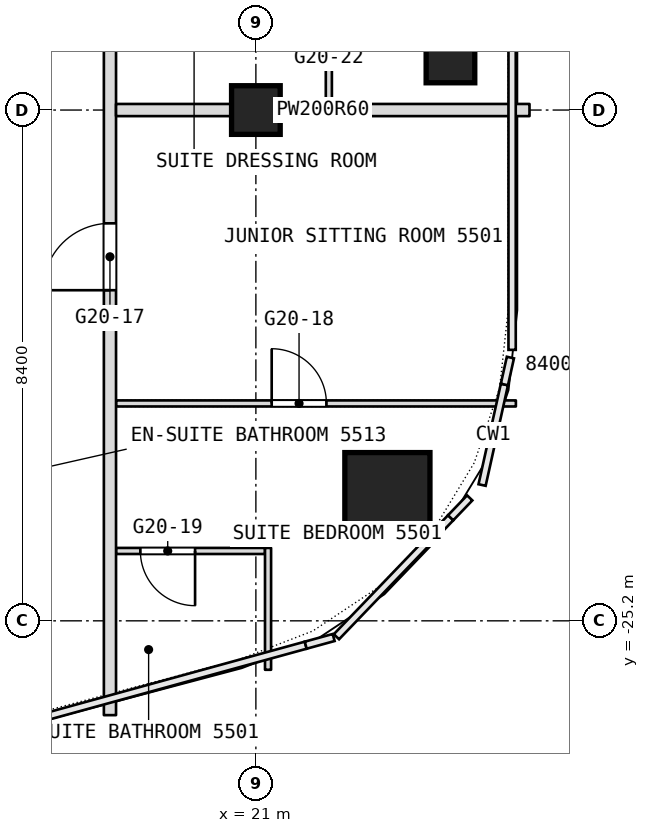
"""IFC4 building model, lengths in metres.
Left out: names, types, materials, properties, quantities, classifications, styles, units other than length and angle.
Written with IfcOpenShell. Run it as: python <this file> out.ifc"""

import sys

from ifc_helpers import new_model, si_unit, direction, frame, frame_2d, origin, origin_2d, place, context, subcontext, project, spatial, rectangle, extrude, element, fill, save


model = new_model("IFC4")
c1 = context("Model", 3, precision=1e-05, world=origin(), true_north=direction((0.0, 1.0)))
c2 = subcontext(c1, "Body", "Model", "MODEL_VIEW")
j1 = project(units=[si_unit("LENGTHUNIT", "METRE"), si_unit("PLANEANGLEUNIT", "RADIAN")], contexts=[c1])
p1 = place(None, origin())
s1 = spatial("IfcSite", under=j1, at=p1, CompositionType="ELEMENT")
p2 = place(p1, origin())
s2 = spatial("IfcBuilding", under=s1, at=p2, CompositionType="ELEMENT")
p3 = place(p2, frame((0.0, 0.0, 234.5)))
s3 = spatial("IfcBuildingStorey", under=s2, at=p3, CompositionType="ELEMENT", Elevation=234.5)
p4 = place(p3, frame((23.163, -23.133, 0.0), z_axis=(0.0, 0.0, 1.0), x_axis=(1.0, 0.0, 0.0)))
e1 = element("IfcColumn", 1, at=p4, inside=s3, PredefinedType="COLUMN", context=c2, shape_type="SweptSolid", body=[
    extrude(rectangle(XDim=1.4, YDim=1.4, at=origin_2d()), origin(), (0.0, 0.0, 1.0), 3.6),
])
for number, where, z_axis, x_axis in (
    (2, (21.0, -16.8, 0.0), (0.0, 0.0, 1.0), (1.0, 0.0, 0.0)),
    (3, (24.2, -15.952, 0.0), (0.0, 0.0, 1.0), (1.0, 0.0, 0.0)),
):
    element("IfcColumn", number, at=place(p3, frame(where, z_axis=z_axis, x_axis=x_axis)), inside=s3, PredefinedType="COLUMN", context=c2, shape_type="SweptSolid", body=[
        extrude(rectangle(XDim=0.8, YDim=0.8, at=origin_2d()), origin(), (0.0, 0.0, 1.0), 3.6),
    ])
p5 = place(p3, frame((18.7, -24.051, 0.0), z_axis=(0.0, 0.0, 1.0), x_axis=(1.0, 0.0, 0.0)))
e4 = element("IfcWall", 4, at=p5, inside=s3, PredefinedType="PARTITIONING", context=c2, shape_type="SweptSolid", body=[
    extrude(rectangle(XDim=2.45, YDim=0.1, at=frame_2d((1.225, 0.0))), origin(), (0.0, 0.0, 1.0), 3.34),
])
p6 = place(p5, frame((0.4, 0.0, 0.0)))
e5 = element("IfcOpeningElement", 5, at=p6, cuts=e4, PredefinedType="OPENING", context=c2, shape_type="SweptSolid", body=[
    extrude(rectangle(XDim=0.9, YDim=2.1, at=frame_2d((0.45, 1.05))), frame((0.0, 0.05, 0.0), z_axis=(0.0, -1.0, 0.0), x_axis=(1.0, 0.0, 0.0)), (0.0, 0.0, 1.0), 0.1),
])
p7 = place(p3, frame((22.2, -16.7, 0.0), z_axis=(0.0, 0.0, 1.0), x_axis=(0.0, 1.0, 0.0)))
e6 = element("IfcWall", 6, at=p7, inside=s3, PredefinedType="PARTITIONING", context=c2, shape_type="SweptSolid", body=[
    extrude(rectangle(XDim=2.35, YDim=0.1, at=frame_2d((1.175, 0.0))), origin(), (0.0, 0.0, 1.0), 3.34),
])
p8 = place(p7, frame((1.3, 0.0, 0.0)))
e7 = element("IfcOpeningElement", 7, at=p8, cuts=e6, PredefinedType="OPENING", context=c2, shape_type="SweptSolid", body=[
    extrude(rectangle(XDim=0.9, YDim=2.1, at=frame_2d((0.45, 1.05))), frame((0.0, 0.05, 0.0), z_axis=(0.0, -1.0, 0.0), x_axis=(1.0, 0.0, 0.0)), (0.0, 0.0, 1.0), 0.1),
])
p9 = place(p3, frame((18.7, -21.625, 0.0), z_axis=(0.0, 0.0, 1.0), x_axis=(1.0, 0.0, 0.0)))
e8 = element("IfcWall", 8, at=p9, inside=s3, PredefinedType="PARTITIONING", context=c2, shape_type="SweptSolid", body=[
    extrude(rectangle(XDim=6.576, YDim=0.1, at=frame_2d((3.288, 0.0))), origin(), (0.0, 0.0, 1.0), 3.34),
])
p10 = place(p9, frame((2.56, 0.0, 0.0)))
e9 = element("IfcOpeningElement", 9, at=p10, cuts=e8, PredefinedType="OPENING", context=c2, shape_type="SweptSolid", body=[
    extrude(rectangle(XDim=0.9, YDim=2.1, at=frame_2d((0.45, 1.05))), frame((0.0, 0.05, 0.0), z_axis=(0.0, -1.0, 0.0), x_axis=(1.0, 0.0, 0.0)), (0.0, 0.0, 1.0), 0.1),
])
p11 = place(p3, frame((21.2, -26.005, 0.0), z_axis=(0.0, 0.0, 1.0), x_axis=(0.0, 1.0, 0.0)))
e10 = element("IfcWall", 10, at=p11, inside=s3, PredefinedType="PARTITIONING", context=c2, shape_type="SweptSolid", body=[
    extrude(rectangle(XDim=2.004, YDim=0.1, at=frame_2d((1.002, 0.0))), origin(), (0.0, 0.0, 1.0), 3.34),
])
p12 = place(p3, frame((18.6, -26.751, 0.0), z_axis=(0.0, 0.0, 1.0), x_axis=(0.0, 1.0, 0.0)))
e11 = element("IfcWall", 11, at=p12, inside=s3, PredefinedType="PARTITIONING", context=c2, shape_type="SweptSolid", body=[
    extrude(rectangle(XDim=49.091, YDim=0.2, at=frame_2d((24.545, 0.0))), origin(), (0.0, 0.0, 1.0), 3.34),
])
p13 = place(p12, frame((6.988, 0.0, 0.0)))
e12 = element("IfcOpeningElement", 12, at=p13, cuts=e11, PredefinedType="OPENING", context=c2, shape_type="SweptSolid", body=[
    extrude(rectangle(XDim=1.1, YDim=2.1, at=frame_2d((0.55, 1.05))), frame((0.0, 0.1, 0.0), z_axis=(0.0, -1.0, 0.0), x_axis=(1.0, 0.0, 0.0)), (0.0, 0.0, 1.0), 0.2),
])
p14 = place(p12, frame((13.551, 0.0, 0.0)))
e13 = element("IfcOpeningElement", 13, at=p14, cuts=e11, PredefinedType="OPENING", context=c2, shape_type="SweptSolid", body=[
    extrude(rectangle(XDim=1.1, YDim=2.1, at=frame_2d((0.55, 1.05))), frame((0.0, 0.1, 0.0), z_axis=(0.0, -1.0, 0.0), x_axis=(1.0, 0.0, 0.0)), (0.0, 0.0, 1.0), 0.2),
])
p15 = place(p12, frame((22.051, 0.0, 0.0)))
e14 = element("IfcOpeningElement", 14, at=p15, cuts=e11, PredefinedType="OPENING", context=c2, shape_type="SweptSolid", body=[
    extrude(rectangle(XDim=1.1, YDim=2.1, at=frame_2d((0.55, 1.05))), frame((0.0, 0.1, 0.0), z_axis=(0.0, -1.0, 0.0), x_axis=(1.0, 0.0, 0.0)), (0.0, 0.0, 1.0), 0.2),
])
p16 = place(p12, frame((28.301, 0.0, 0.0)))
e15 = element("IfcOpeningElement", 15, at=p16, cuts=e11, PredefinedType="OPENING", context=c2, shape_type="SweptSolid", body=[
    extrude(rectangle(XDim=1.1, YDim=2.1, at=frame_2d((0.55, 1.05))), frame((0.0, 0.1, 0.0), z_axis=(0.0, -1.0, 0.0), x_axis=(1.0, 0.0, 0.0)), (0.0, 0.0, 1.0), 0.2),
])
p17 = place(p12, frame((37.951, 0.0, 0.0)))
e16 = element("IfcOpeningElement", 16, at=p17, cuts=e11, PredefinedType="OPENING", context=c2, shape_type="SweptSolid", body=[
    extrude(rectangle(XDim=1.0, YDim=2.1, at=frame_2d((0.5, 1.05))), frame((0.0, 0.1, 0.0), z_axis=(0.0, -1.0, 0.0), x_axis=(1.0, 0.0, 0.0)), (0.0, 0.0, 1.0), 0.2),
])
p18 = place(p12, frame((39.751, 0.0, 0.0)))
e17 = element("IfcOpeningElement", 17, at=p18, cuts=e11, PredefinedType="OPENING", context=c2, shape_type="SweptSolid", body=[
    extrude(rectangle(XDim=1.0, YDim=2.1, at=frame_2d((0.5, 1.05))), frame((0.0, 0.1, 0.0), z_axis=(0.0, -1.0, 0.0), x_axis=(1.0, 0.0, 0.0)), (0.0, 0.0, 1.0), 0.2),
])
p19 = place(p12, frame((44.051, 0.0, 0.0)))
e18 = element("IfcOpeningElement", 18, at=p19, cuts=e11, PredefinedType="OPENING", context=c2, shape_type="SweptSolid", body=[
    extrude(rectangle(XDim=1.0, YDim=2.1, at=frame_2d((0.5, 1.05))), frame((0.0, 0.1, 0.0), z_axis=(0.0, -1.0, 0.0), x_axis=(1.0, 0.0, 0.0)), (0.0, 0.0, 1.0), 0.2),
])
p20 = place(p3, frame((18.7, -16.8, 0.0), z_axis=(0.0, 0.0, 1.0), x_axis=(1.0, 0.0, 0.0)))
e19 = element("IfcWall", 19, at=p20, inside=s3, PredefinedType="PARTITIONING", context=c2, shape_type="SweptSolid", body=[
    extrude(rectangle(XDim=6.8, YDim=0.2, at=frame_2d((3.4, 0.0))), origin(), (0.0, 0.0, 1.0), 2.94),
])
p21 = place(p6, origin())
e20 = element("IfcDoor", 20, at=p21, inside=s3, OperationType="SINGLE_SWING_RIGHT", PredefinedType="DOOR", context=c2, shape_type="SweptSolid", body=[
    extrude(rectangle(XDim=0.9, YDim=2.1, at=frame_2d((0.45, 1.05))), frame((0.0, 0.025, 0.0), z_axis=(0.0, -1.0, 0.0), x_axis=(1.0, 0.0, 0.0)), (0.0, 0.0, 1.0), 0.05),
])
fill(e5, e20)
p22 = place(p10, origin())
e21 = element("IfcDoor", 21, at=p22, inside=s3, OperationType="SINGLE_SWING_LEFT", PredefinedType="DOOR", context=c2, shape_type="SweptSolid", body=[
    extrude(rectangle(XDim=0.9, YDim=2.1, at=frame_2d((0.45, 1.05))), frame((0.0, 0.025, 0.0), z_axis=(0.0, -1.0, 0.0), x_axis=(1.0, 0.0, 0.0)), (0.0, 0.0, 1.0), 0.05),
])
fill(e9, e21)
p23 = place(p13, origin())
e22 = element("IfcDoor", 22, at=p23, inside=s3, OperationType="SINGLE_SWING_LEFT", PredefinedType="DOOR", context=c2, shape_type="SweptSolid", body=[
    extrude(rectangle(XDim=1.1, YDim=2.1, at=frame_2d((0.55, 1.05))), frame((0.0, 0.025, 0.0), z_axis=(0.0, -1.0, 0.0), x_axis=(1.0, 0.0, 0.0)), (0.0, 0.0, 1.0), 0.05),
])
fill(e12, e22)
save(model, sys.argv[1])
